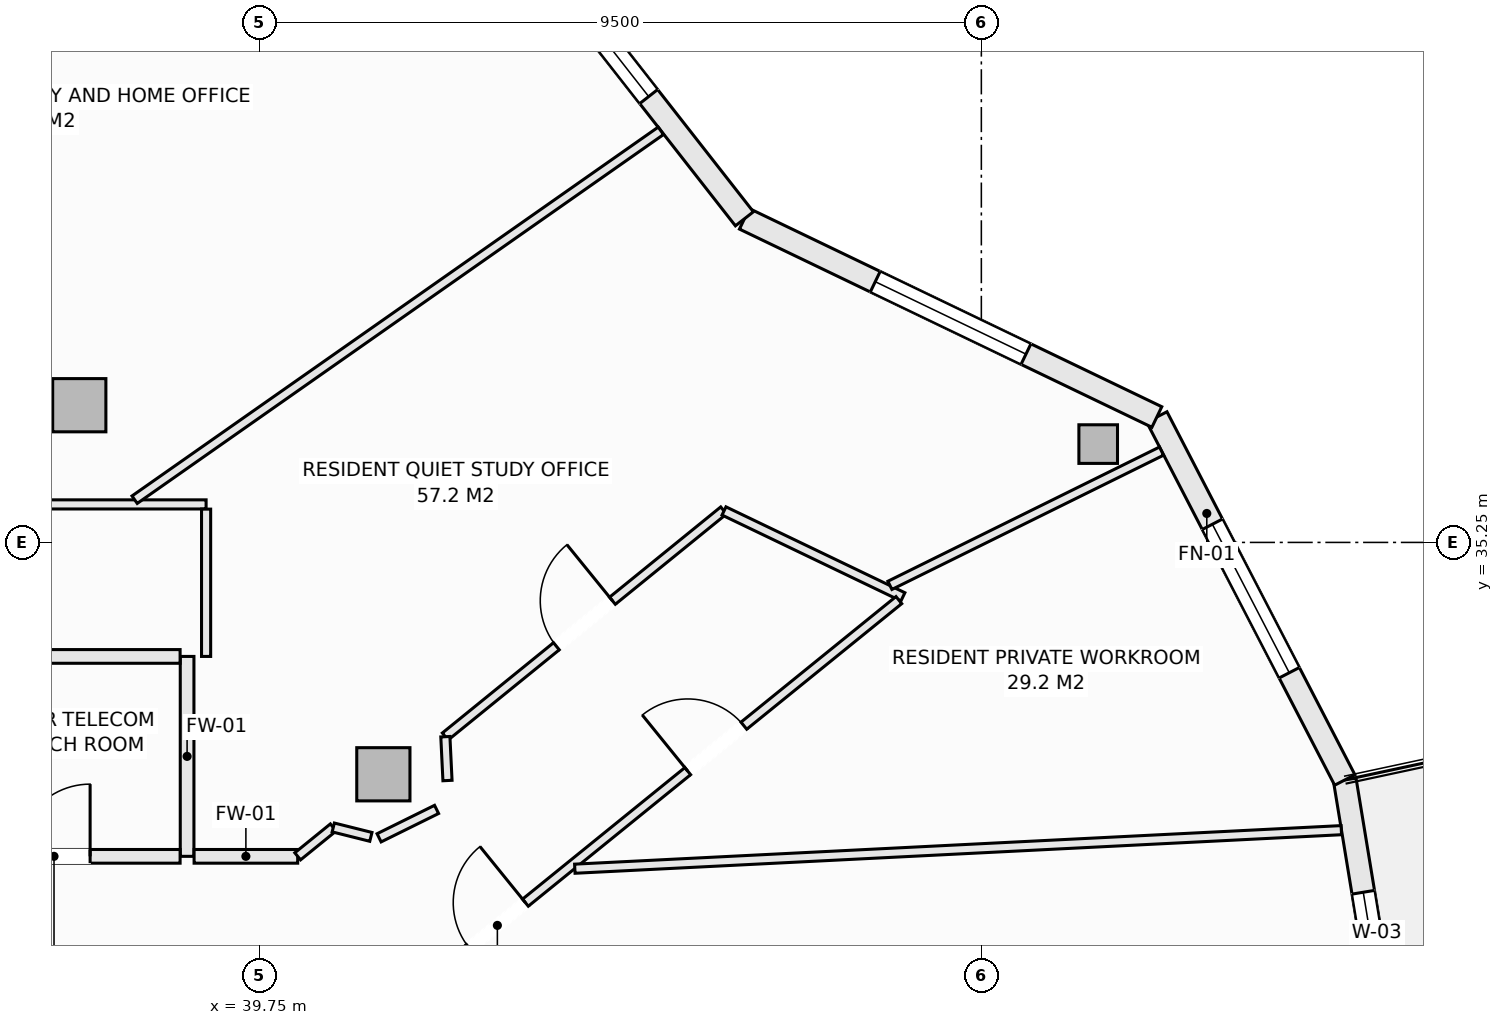
"""IFC4 building model, lengths in metres.
Left out: names, types, materials, properties, quantities, classifications, styles, units other than length and angle.
Written with IfcOpenShell. Run it as: python <this file> out.ifc"""

import sys

from ifc_helpers import new_model, si_unit, direction, frame, frame_2d, origin, origin_2d, place, context, subcontext, project, spatial, rectangle, hollow_rectangle, extrude, element, fill, save


model = new_model("IFC4")
c1 = context("Model", 3, precision=1e-05, world=origin(), true_north=direction((0.0, 1.0)))
c2 = subcontext(c1, "Body", "Model", "MODEL_VIEW")
j1 = project(units=[si_unit("LENGTHUNIT", "METRE"), si_unit("PLANEANGLEUNIT", "RADIAN")], contexts=[c1])
p1 = place(None, origin())
s1 = spatial("IfcSite", under=j1, at=p1, CompositionType="ELEMENT")
p2 = place(p1, origin())
s2 = spatial("IfcBuilding", under=s1, at=p2, CompositionType="ELEMENT")
p3 = place(p2, frame((0.0, 0.0, 222.8)))
s3 = spatial("IfcBuildingStorey", under=s2, at=p3, CompositionType="ELEMENT", Elevation=222.8)
p4 = place(p3, frame((50.787, 36.544, -0.27), z_axis=(0.0, 0.0, 1.0), x_axis=(1.0, 0.0, 0.0)))
e1 = element("IfcColumn", 1, at=p4, inside=s3, PredefinedType="COLUMN", context=c2, shape_type="SweptSolid", body=[
    extrude(hollow_rectangle(XDim=0.508, YDim=0.508, WallThickness=0.019, at=origin_2d()), origin(), (0.0, 0.0, 1.0), 3.3),
])
for number, where, z_axis, x_axis in (
    (2, (41.382, 32.199, -0.27), (0.0, 0.0, 1.0), (1.0, 0.0, 0.0)),
    (3, (37.382, 37.055, -0.27), (0.0, 0.0, 1.0), (1.0, 0.0, 0.0)),
):
    element("IfcColumn", number, at=place(p3, frame(where, z_axis=z_axis, x_axis=x_axis)), inside=s3, PredefinedType="COLUMN", context=c2, shape_type="SweptSolid", body=[
        extrude(rectangle(XDim=0.7, YDim=0.7, at=origin_2d()), origin(), (0.0, 0.0, 1.0), 3.3),
    ])
p5 = place(p3, frame((54.032, 32.125, 0.0), z_axis=(0.0, 0.0, 1.0), x_axis=(0.16237087798, -0.986729799886, 0.0)))
e4 = element("IfcWall", 4, at=p5, inside=s3, PredefinedType="SOLIDWALL", context=c2, shape_type="SweptSolid", body=[
    extrude(rectangle(XDim=5.193, YDim=0.3, at=frame_2d((2.597, 0.0))), origin(), (0.0, 0.0, 1.0), 2.605),
])
p6 = place(p5, frame((1.497, 0.0, 0.72)))
e5 = element("IfcOpeningElement", 5, at=p6, cuts=e4, PredefinedType="OPENING", context=c2, shape_type="SweptSolid", body=[
    extrude(rectangle(XDim=2.2, YDim=1.65, at=frame_2d((1.1, 0.825))), frame((0.0, 0.16, 0.0), z_axis=(0.0, -1.0, 0.0), x_axis=(1.0, 0.0, 0.0)), (0.0, 0.0, 1.0), 0.32),
])
p7 = place(p3, frame((51.559, 36.9, 0.0), z_axis=(0.0, 0.0, 1.0), x_axis=(0.459808219482, -0.888018243786, 0.0)))
e6 = element("IfcWall", 6, at=p7, inside=s3, PredefinedType="SOLIDWALL", context=c2, shape_type="SweptSolid", body=[
    extrude(rectangle(XDim=5.378, YDim=0.3, at=frame_2d((2.689, 0.0))), origin(), (0.0, 0.0, 1.0), 2.605),
])
p8 = place(p7, frame((1.589, 0.0, 0.72)))
e7 = element("IfcOpeningElement", 7, at=p8, cuts=e6, PredefinedType="OPENING", context=c2, shape_type="SweptSolid", body=[
    extrude(rectangle(XDim=2.2, YDim=1.65, at=frame_2d((1.1, 0.825))), frame((0.0, 0.16, 0.0), z_axis=(0.0, -1.0, 0.0), x_axis=(1.0, 0.0, 0.0)), (0.0, 0.0, 1.0), 0.32),
])
p9 = place(p3, frame((46.133, 39.507, 0.0), z_axis=(0.0, 0.0, 1.0), x_axis=(0.901348331142, -0.433094892545, 0.0)))
e8 = element("IfcWall", 8, at=p9, inside=s3, PredefinedType="SOLIDWALL", context=c2, shape_type="SweptSolid", body=[
    extrude(rectangle(XDim=6.021, YDim=0.3, at=frame_2d((3.01, 0.0))), origin(), (0.0, 0.0, 1.0), 2.605),
])
p10 = place(p9, frame((1.91, 0.0, 0.72)))
e9 = element("IfcOpeningElement", 9, at=p10, cuts=e8, PredefinedType="OPENING", context=c2, shape_type="SweptSolid", body=[
    extrude(rectangle(XDim=2.2, YDim=1.65, at=frame_2d((1.1, 0.825))), frame((0.0, 0.16, 0.0), z_axis=(0.0, -1.0, 0.0), x_axis=(1.0, 0.0, 0.0)), (0.0, 0.0, 1.0), 0.32),
])
p11 = place(p3, frame((42.5, 44.147, 0.0), z_axis=(0.0, 0.0, 1.0), x_axis=(0.616450126935, -0.787393955401, 0.0)))
e10 = element("IfcWall", 10, at=p11, inside=s3, PredefinedType="SOLIDWALL", context=c2, shape_type="SweptSolid", body=[
    extrude(rectangle(XDim=5.893, YDim=0.3, at=frame_2d((2.946, 0.0))), origin(), (0.0, 0.0, 1.0), 2.605),
])
p12 = place(p11, frame((1.65, 0.0, 0.72)))
e11 = element("IfcOpeningElement", 11, at=p12, cuts=e10, PredefinedType="OPENING", context=c2, shape_type="SweptSolid", body=[
    extrude(rectangle(XDim=2.2, YDim=1.65, at=frame_2d((1.1, 0.825))), frame((0.0, 0.16, 0.0), z_axis=(0.0, -1.0, 0.0), x_axis=(1.0, 0.0, 0.0)), (0.0, 0.0, 1.0), 0.32),
])
p13 = place(p3, frame((38.8, 31.12, 0.0), z_axis=(0.0, 0.0, 1.0), x_axis=(0.0, 1.0, 0.0)))
e12 = element("IfcWall", 12, at=p13, inside=s3, PredefinedType="SOLIDWALL", context=c2, shape_type="SweptSolid", body=[
    extrude(rectangle(XDim=2.63, YDim=0.18, at=frame_2d((1.315, 0.0))), origin(), (0.0, 0.0, 1.0), 3.03),
])
p14 = place(p3, frame((30.077, 31.12, 0.0), z_axis=(0.0, 0.0, 1.0), x_axis=(1.0, 0.0, 0.0)))
e13 = element("IfcWall", 13, at=p14, inside=s3, PredefinedType="SOLIDWALL", context=c2, shape_type="SweptSolid", body=[
    extrude(rectangle(XDim=8.631, YDim=0.18, at=frame_2d((4.315, 0.0))), origin(), (0.0, 0.0, 1.0), 3.03),
])
p15 = place(p14, frame((2.592, 0.0, 0.0)))
e14 = element("IfcOpeningElement", 14, at=p15, cuts=e13, PredefinedType="OPENING", context=c2, shape_type="SweptSolid", body=[
    extrude(rectangle(XDim=0.95, YDim=2.1, at=frame_2d((0.475, 1.05))), frame((0.0, 0.1, 0.0), z_axis=(0.0, -1.0, 0.0), x_axis=(1.0, 0.0, 0.0)), (0.0, 0.0, 1.0), 0.2),
])
p16 = place(p14, frame((6.497, 0.0, 0.0)))
e15 = element("IfcOpeningElement", 15, at=p16, cuts=e13, PredefinedType="OPENING", context=c2, shape_type="SweptSolid", body=[
    extrude(rectangle(XDim=0.95, YDim=2.1, at=frame_2d((0.475, 1.05))), frame((0.0, 0.1, 0.0), z_axis=(0.0, -1.0, 0.0), x_axis=(1.0, 0.0, 0.0)), (0.0, 0.0, 1.0), 0.2),
])
p17 = place(p3, frame((38.892, 31.12, 0.0), z_axis=(0.0, 0.0, 1.0), x_axis=(1.0, 0.0, 0.0)))
e16 = element("IfcWall", 16, at=p17, inside=s3, PredefinedType="SOLIDWALL", context=c2, shape_type="SweptSolid", body=[
    extrude(rectangle(XDim=1.363, YDim=0.18, at=frame_2d((0.681, 0.0))), origin(), (0.0, 0.0, 1.0), 3.03),
])
p18 = place(p3, frame((30.077, 33.75, 0.0), z_axis=(0.0, 0.0, 1.0), x_axis=(1.0, 0.0, 0.0)))
e17 = element("IfcWall", 17, at=p18, inside=s3, PredefinedType="SOLIDWALL", context=c2, shape_type="SweptSolid", body=[
    extrude(rectangle(XDim=8.631, YDim=0.18, at=frame_2d((4.315, 0.0))), origin(), (0.0, 0.0, 1.0), 3.03),
])
p19 = place(p3, frame((30.062, 35.75, 0.0), z_axis=(0.0, 0.0, 1.0), x_axis=(1.0, 0.0, 0.0)))
e18 = element("IfcWall", 18, at=p19, inside=s3, PredefinedType="PARTITIONING", context=c2, shape_type="SweptSolid", body=[
    extrude(rectangle(XDim=8.988, YDim=0.12, at=frame_2d((4.494, 0.0))), origin(), (0.0, 0.0, 1.0), 2.478),
])
p20 = place(p19, frame((4.567, 0.0, 0.0)))
e19 = element("IfcOpeningElement", 19, at=p20, cuts=e18, PredefinedType="OPENING", context=c2, shape_type="SweptSolid", body=[
    extrude(rectangle(XDim=0.95, YDim=2.1, at=frame_2d((0.475, 1.05))), frame((0.0, 0.07, 0.0), z_axis=(0.0, -1.0, 0.0), x_axis=(1.0, 0.0, 0.0)), (0.0, 0.0, 1.0), 0.14),
])
p21 = place(p3, frame((39.05, 33.75, 0.0), z_axis=(0.0, 0.0, 1.0), x_axis=(0.0, 1.0, 0.0)))
e20 = element("IfcWall", 20, at=p21, inside=s3, PredefinedType="PARTITIONING", context=c2, shape_type="SweptSolid", body=[
    extrude(rectangle(XDim=1.938, YDim=0.12, at=frame_2d((0.969, 0.0))), origin(), (0.0, 0.0, 1.0), 3.03),
])
p22 = place(p3, frame((40.255, 31.12, 0.0), z_axis=(0.0, 0.0, 1.0), x_axis=(0.776423627794, 0.630211353598, 0.0)))
e21 = element("IfcWall", 21, at=p22, inside=s3, PredefinedType="PARTITIONING", context=c2, shape_type="SweptSolid", body=[
    extrude(rectangle(XDim=0.603, YDim=0.12, at=frame_2d((0.301, 0.0))), origin(), (0.0, 0.0, 1.0), 3.03),
])
p23 = place(p3, frame((42.196, 32.696, 0.0), z_axis=(0.0, 0.0, 1.0), x_axis=(0.776319732197, 0.630339331949, 0.0)))
e22 = element("IfcWall", 22, at=p23, inside=s3, PredefinedType="PARTITIONING", context=c2, shape_type="SweptSolid", body=[
    extrude(rectangle(XDim=4.718, YDim=0.12, at=frame_2d((2.359, 0.0))), origin(), (0.0, 0.0, 1.0), 2.77),
])
p24 = place(p23, frame((1.884, 0.0, 0.0)))
e23 = element("IfcOpeningElement", 23, at=p24, cuts=e22, PredefinedType="OPENING", context=c2, shape_type="SweptSolid", body=[
    extrude(rectangle(XDim=0.95, YDim=2.1, at=frame_2d((0.475, 1.05))), frame((0.0, 0.07, 0.0), z_axis=(0.0, -1.0, 0.0), x_axis=(1.0, 0.0, 0.0)), (0.0, 0.0, 1.0), 0.14),
])
p25 = place(p3, frame((40.723, 31.5, 0.0), z_axis=(0.0, 0.0, 1.0), x_axis=(0.970029850173, -0.24298578101, 0.0)))
e24 = element("IfcWall", 24, at=p25, inside=s3, PredefinedType="PARTITIONING", context=c2, shape_type="SweptSolid", body=[
    extrude(rectangle(XDim=0.51, YDim=0.12, at=frame_2d((0.255, 0.0))), origin(), (0.0, 0.0, 1.0), 3.03),
])
p26 = place(p3, frame((42.198, 32.694, 0.0), z_axis=(0.0, 0.0, 1.0), x_axis=(0.048629948931, -0.998816864128, 0.0)))
e25 = element("IfcWall", 25, at=p26, inside=s3, PredefinedType="PARTITIONING", context=c2, shape_type="SweptSolid", body=[
    extrude(rectangle(XDim=0.577, YDim=0.12, at=frame_2d((0.289, 0.0))), origin(), (0.0, 0.0, 1.0), 3.03),
])
p27 = place(p3, frame((45.864, 35.664, 0.0), z_axis=(0.0, 0.0, 1.0), x_axis=(0.901492416592, -0.432794896951, 0.0)))
e26 = element("IfcWall", 26, at=p27, inside=s3, PredefinedType="PARTITIONING", context=c2, shape_type="SweptSolid", body=[
    extrude(rectangle(XDim=2.611, YDim=0.12, at=frame_2d((1.306, 0.0))), origin(), (0.0, 0.0, 1.0), 3.03),
])
p28 = place(p3, frame((41.52, 29.108, 0.0), z_axis=(0.0, 0.0, 1.0), x_axis=(0.777032738693, 0.629460183808, 0.0)))
e27 = element("IfcWall", 27, at=p28, inside=s3, PredefinedType="PARTITIONING", context=c2, shape_type="SweptSolid", body=[
    extrude(rectangle(XDim=8.552, YDim=0.12, at=frame_2d((4.276, 0.0))), origin(), (0.0, 0.0, 1.0), 3.03),
])
p29 = place(p28, frame((1.278, 0.0, 0.0)))
e28 = element("IfcOpeningElement", 28, at=p29, cuts=e27, PredefinedType="OPENING", context=c2, shape_type="SweptSolid", body=[
    extrude(rectangle(XDim=0.95, YDim=2.1, at=frame_2d((0.475, 1.05))), frame((0.0, 0.07, 0.0), z_axis=(0.0, -1.0, 0.0), x_axis=(1.0, 0.0, 0.0)), (0.0, 0.0, 1.0), 0.14),
])
p30 = place(p28, frame((4.977, 0.0, 0.0)))
e29 = element("IfcOpeningElement", 29, at=p30, cuts=e27, PredefinedType="OPENING", context=c2, shape_type="SweptSolid", body=[
    extrude(rectangle(XDim=0.95, YDim=2.1, at=frame_2d((0.475, 1.05))), frame((0.0, 0.07, 0.0), z_axis=(0.0, -1.0, 0.0), x_axis=(1.0, 0.0, 0.0)), (0.0, 0.0, 1.0), 0.14),
])
p31 = place(p3, frame((43.901, 30.957, 0.0), z_axis=(0.0, 0.0, 1.0), x_axis=(0.998738311517, 0.050217378547, 0.0)))
e30 = element("IfcWall", 30, at=p31, inside=s3, PredefinedType="PARTITIONING", context=c2, shape_type="SweptSolid", body=[
    extrude(rectangle(XDim=10.098, YDim=0.12, at=frame_2d((5.049, 0.0))), origin(), (0.0, 0.0, 1.0), 3.03),
])
p32 = place(p3, frame((41.326, 31.364, 0.0), z_axis=(0.0, 0.0, 1.0), x_axis=(0.896444200568, 0.443156626112, 0.0)))
e31 = element("IfcWall", 31, at=p32, inside=s3, PredefinedType="PARTITIONING", context=c2, shape_type="SweptSolid", body=[
    extrude(rectangle(XDim=0.844, YDim=0.12, at=frame_2d((0.422, 0.0))), origin(), (0.0, 0.0, 1.0), 3.03),
])
p33 = place(p3, frame((48.047, 34.685, 0.0), z_axis=(0.0, 0.0, 1.0), x_axis=(0.896512119569, 0.443019208912, 0.0)))
e32 = element("IfcWall", 32, at=p33, inside=s3, PredefinedType="PARTITIONING", context=c2, shape_type="SweptSolid", body=[
    extrude(rectangle(XDim=3.986, YDim=0.12, at=frame_2d((1.993, 0.0))), origin(), (0.0, 0.0, 1.0), 3.03),
])
p34 = place(p3, frame((38.11, 35.812, 0.0), z_axis=(0.0, 0.0, 1.0), x_axis=(0.81888313017, 0.57396029403, 0.0)))
e33 = element("IfcWall", 33, at=p34, inside=s3, PredefinedType="PARTITIONING", context=c2, shape_type="SweptSolid", body=[
    extrude(rectangle(XDim=8.455, YDim=0.12, at=frame_2d((4.228, 0.0))), origin(), (0.0, 0.0, 1.0), 3.03),
])
p35 = place(p6, origin())
e34 = element("IfcWindow", 34, at=p35, inside=s3, PartitioningType="SINGLE_PANEL", PredefinedType="WINDOW", context=c2, shape_type="SweptSolid", body=[
    extrude(rectangle(XDim=2.2, YDim=1.65, at=frame_2d((1.1, 0.825))), frame((0.0, 0.03, 0.0), z_axis=(0.0, -1.0, 0.0), x_axis=(1.0, 0.0, 0.0)), (0.0, 0.0, 1.0), 0.06),
])
fill(e5, e34)
p36 = place(p8, origin())
e35 = element("IfcWindow", 35, at=p36, inside=s3, PartitioningType="SINGLE_PANEL", PredefinedType="WINDOW", context=c2, shape_type="SweptSolid", body=[
    extrude(rectangle(XDim=2.2, YDim=1.65, at=frame_2d((1.1, 0.825))), frame((0.0, 0.03, 0.0), z_axis=(0.0, -1.0, 0.0), x_axis=(1.0, 0.0, 0.0)), (0.0, 0.0, 1.0), 0.06),
])
fill(e7, e35)
p37 = place(p10, origin())
e36 = element("IfcWindow", 36, at=p37, inside=s3, PartitioningType="SINGLE_PANEL", PredefinedType="WINDOW", context=c2, shape_type="SweptSolid", body=[
    extrude(rectangle(XDim=2.2, YDim=1.65, at=frame_2d((1.1, 0.825))), frame((0.0, 0.03, 0.0), z_axis=(0.0, -1.0, 0.0), x_axis=(1.0, 0.0, 0.0)), (0.0, 0.0, 1.0), 0.06),
])
fill(e9, e36)
p38 = place(p12, origin())
e37 = element("IfcWindow", 37, at=p38, inside=s3, PartitioningType="SINGLE_PANEL", PredefinedType="WINDOW", context=c2, shape_type="SweptSolid", body=[
    extrude(rectangle(XDim=2.2, YDim=1.65, at=frame_2d((1.1, 0.825))), frame((0.0, 0.03, 0.0), z_axis=(0.0, -1.0, 0.0), x_axis=(1.0, 0.0, 0.0)), (0.0, 0.0, 1.0), 0.06),
])
fill(e11, e37)
p39 = place(p16, origin())
e38 = element("IfcDoor", 38, at=p39, inside=s3, OperationType="SINGLE_SWING_RIGHT", PredefinedType="DOOR", context=c2, shape_type="SweptSolid", body=[
    extrude(rectangle(XDim=0.95, YDim=2.1, at=frame_2d((0.475, 1.05))), frame((0.0, 0.025, 0.0), z_axis=(0.0, -1.0, 0.0), x_axis=(1.0, 0.0, 0.0)), (0.0, 0.0, 1.0), 0.05),
])
fill(e15, e38)
p40 = place(p29, origin())
e39 = element("IfcDoor", 39, at=p40, inside=s3, OperationType="SINGLE_SWING_RIGHT", PredefinedType="DOOR", context=c2, shape_type="SweptSolid", body=[
    extrude(rectangle(XDim=0.95, YDim=2.1, at=frame_2d((0.475, 1.05))), frame((0.0, 0.025, 0.0), z_axis=(0.0, -1.0, 0.0), x_axis=(1.0, 0.0, 0.0)), (0.0, 0.0, 1.0), 0.05),
])
fill(e28, e39)
p41 = place(p30, origin())
e40 = element("IfcDoor", 40, at=p41, inside=s3, OperationType="SINGLE_SWING_LEFT", PredefinedType="DOOR", context=c2, shape_type="SweptSolid", body=[
    extrude(rectangle(XDim=0.95, YDim=2.1, at=frame_2d((0.475, 1.05))), frame((0.0, 0.025, 0.0), z_axis=(0.0, -1.0, 0.0), x_axis=(1.0, 0.0, 0.0)), (0.0, 0.0, 1.0), 0.05),
])
fill(e29, e40)
p42 = place(p24, origin())
e41 = element("IfcDoor", 41, at=p42, inside=s3, OperationType="SINGLE_SWING_RIGHT", PredefinedType="DOOR", context=c2, shape_type="SweptSolid", body=[
    extrude(rectangle(XDim=0.95, YDim=2.1, at=frame_2d((0.475, 1.05))), frame((0.0, 0.025, 0.0), z_axis=(0.0, -1.0, 0.0), x_axis=(1.0, 0.0, 0.0)), (0.0, 0.0, 1.0), 0.05),
])
fill(e23, e41)
save(model, sys.argv[1])
